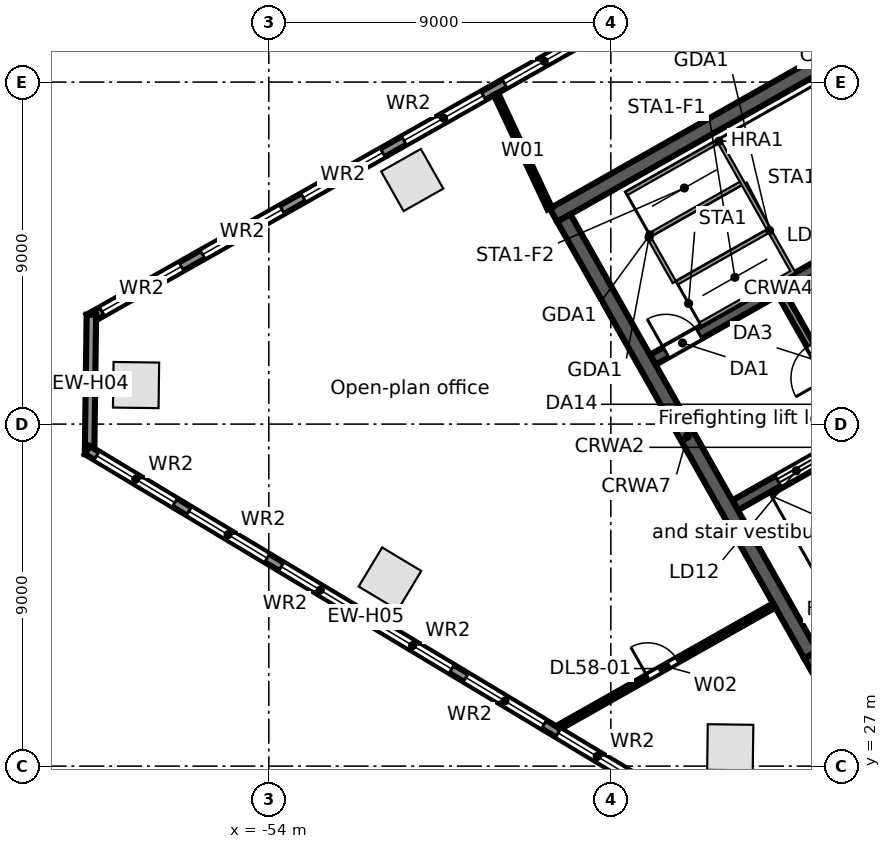
"""IFC4 building model, lengths in metres.
Left out: names, types, materials, properties, quantities, classifications, styles, units other than length and angle.
Written with IfcOpenShell. Run it as: python <this file> out.ifc"""

import sys

from ifc_helpers import new_model, si_unit, direction, frame, frame_2d, origin, origin_2d, place, context, subcontext, project, spatial, rectangle, extrude, element, fill, save


model = new_model("IFC4")
c1 = context("Model", 3, precision=1e-05, world=origin(), true_north=direction((0.0, 1.0)))
c2 = subcontext(c1, "Body", "Model", "MODEL_VIEW")
j1 = project(units=[si_unit("LENGTHUNIT", "METRE"), si_unit("PLANEANGLEUNIT", "RADIAN")], contexts=[c1])
p1 = place(None, origin())
s1 = spatial("IfcSite", under=j1, at=p1, CompositionType="ELEMENT")
p2 = place(p1, origin())
s2 = spatial("IfcBuilding", under=s1, at=p2, CompositionType="ELEMENT")
p3 = place(p2, frame((0.0, 0.0, 266.5)))
s3 = spatial("IfcBuildingStorey", under=s2, at=p3, CompositionType="ELEMENT", Elevation=266.5)
for number, where, z_axis, x_axis in (
    (1, (-50.226, 42.423, 0.0), (0.0, 0.0, 1.0), (-0.87, -0.492, 0.0)),
    (2, (-57.493, 37.027, 0.0), (0.0, 0.0, 1.0), (-0.013, -1.0, 0.0)),
    (3, (-50.812, 31.931, 0.0), (0.0, 0.0, 1.0), (0.857, -0.515, 0.0)),
    (4, (-41.858, 27.495, 0.0), (0.0, 0.0, 1.0), (1.0, -0.013, 0.0)),
):
    element("IfcColumn", number, at=place(p3, frame(where, z_axis=z_axis, x_axis=x_axis)), inside=s3, PredefinedType="COLUMN", context=c2, shape_type="SweptSolid", body=[
        extrude(rectangle(XDim=1.2, YDim=1.2, at=origin_2d()), origin(), (0.0, 0.0, 1.0), 3.8),
    ])
p4 = place(p3, frame((-58.732, 38.771, 0.0), z_axis=(0.0, 0.0, 1.0), x_axis=(0.870355615581, 0.492423702137, 0.0)))
e5 = element("IfcWall", 5, at=p4, inside=s3, PredefinedType="STANDARD", context=c2, shape_type="SweptSolid", body=[
    extrude(rectangle(XDim=64.052, YDim=0.25, at=frame_2d((32.026, 0.0))), origin(), (0.0, 0.0, 1.0), 3.52),
])
p5 = place(p4, frame((61.259, 0.0, 0.8)))
e6 = element("IfcOpeningElement", 6, at=p5, cuts=e5, PredefinedType="OPENING", context=c2, shape_type="SweptSolid", body=[
    extrude(rectangle(XDim=2.4, YDim=2.2, at=frame_2d((1.2, 1.1))), frame((0.0, 0.135, 0.0), z_axis=(0.0, -1.0, 0.0), x_axis=(1.0, 0.0, 0.0)), (0.0, 0.0, 1.0), 0.27),
])
p6 = place(p4, frame((58.216, 0.0, 0.8)))
e7 = element("IfcOpeningElement", 7, at=p6, cuts=e5, PredefinedType="OPENING", context=c2, shape_type="SweptSolid", body=[
    extrude(rectangle(XDim=2.4, YDim=2.2, at=frame_2d((1.2, 1.1))), frame((0.0, 0.135, 0.0), z_axis=(0.0, -1.0, 0.0), x_axis=(1.0, 0.0, 0.0)), (0.0, 0.0, 1.0), 0.27),
])
p7 = place(p4, frame((55.173, 0.0, 0.8)))
e8 = element("IfcOpeningElement", 8, at=p7, cuts=e5, PredefinedType="OPENING", context=c2, shape_type="SweptSolid", body=[
    extrude(rectangle(XDim=2.4, YDim=2.2, at=frame_2d((1.2, 1.1))), frame((0.0, 0.135, 0.0), z_axis=(0.0, -1.0, 0.0), x_axis=(1.0, 0.0, 0.0)), (0.0, 0.0, 1.0), 0.27),
])
p8 = place(p4, frame((52.129, 0.0, 0.8)))
e9 = element("IfcOpeningElement", 9, at=p8, cuts=e5, PredefinedType="OPENING", context=c2, shape_type="SweptSolid", body=[
    extrude(rectangle(XDim=2.4, YDim=2.2, at=frame_2d((1.2, 1.1))), frame((0.0, 0.135, 0.0), z_axis=(0.0, -1.0, 0.0), x_axis=(1.0, 0.0, 0.0)), (0.0, 0.0, 1.0), 0.27),
])
p9 = place(p4, frame((49.086, 0.0, 0.8)))
e10 = element("IfcOpeningElement", 10, at=p9, cuts=e5, PredefinedType="OPENING", context=c2, shape_type="SweptSolid", body=[
    extrude(rectangle(XDim=2.4, YDim=2.2, at=frame_2d((1.2, 1.1))), frame((0.0, 0.135, 0.0), z_axis=(0.0, -1.0, 0.0), x_axis=(1.0, 0.0, 0.0)), (0.0, 0.0, 1.0), 0.27),
])
p10 = place(p4, frame((46.043, 0.0, 0.8)))
e11 = element("IfcOpeningElement", 11, at=p10, cuts=e5, PredefinedType="OPENING", context=c2, shape_type="SweptSolid", body=[
    extrude(rectangle(XDim=2.4, YDim=2.2, at=frame_2d((1.2, 1.1))), frame((0.0, 0.135, 0.0), z_axis=(0.0, -1.0, 0.0), x_axis=(1.0, 0.0, 0.0)), (0.0, 0.0, 1.0), 0.27),
])
p11 = place(p4, frame((43.0, 0.0, 0.8)))
e12 = element("IfcOpeningElement", 12, at=p11, cuts=e5, PredefinedType="OPENING", context=c2, shape_type="SweptSolid", body=[
    extrude(rectangle(XDim=2.4, YDim=2.2, at=frame_2d((1.2, 1.1))), frame((0.0, 0.135, 0.0), z_axis=(0.0, -1.0, 0.0), x_axis=(1.0, 0.0, 0.0)), (0.0, 0.0, 1.0), 0.27),
])
p12 = place(p4, frame((39.956, 0.0, 0.8)))
e13 = element("IfcOpeningElement", 13, at=p12, cuts=e5, PredefinedType="OPENING", context=c2, shape_type="SweptSolid", body=[
    extrude(rectangle(XDim=2.4, YDim=2.2, at=frame_2d((1.2, 1.1))), frame((0.0, 0.135, 0.0), z_axis=(0.0, -1.0, 0.0), x_axis=(1.0, 0.0, 0.0)), (0.0, 0.0, 1.0), 0.27),
])
p13 = place(p4, frame((36.913, 0.0, 0.8)))
e14 = element("IfcOpeningElement", 14, at=p13, cuts=e5, PredefinedType="OPENING", context=c2, shape_type="SweptSolid", body=[
    extrude(rectangle(XDim=2.4, YDim=2.2, at=frame_2d((1.2, 1.1))), frame((0.0, 0.135, 0.0), z_axis=(0.0, -1.0, 0.0), x_axis=(1.0, 0.0, 0.0)), (0.0, 0.0, 1.0), 0.27),
])
p14 = place(p4, frame((33.87, 0.0, 0.8)))
e15 = element("IfcOpeningElement", 15, at=p14, cuts=e5, PredefinedType="OPENING", context=c2, shape_type="SweptSolid", body=[
    extrude(rectangle(XDim=2.4, YDim=2.2, at=frame_2d((1.2, 1.1))), frame((0.0, 0.135, 0.0), z_axis=(0.0, -1.0, 0.0), x_axis=(1.0, 0.0, 0.0)), (0.0, 0.0, 1.0), 0.27),
])
p15 = place(p4, frame((30.826, 0.0, 0.8)))
e16 = element("IfcOpeningElement", 16, at=p15, cuts=e5, PredefinedType="OPENING", context=c2, shape_type="SweptSolid", body=[
    extrude(rectangle(XDim=2.4, YDim=2.2, at=frame_2d((1.2, 1.1))), frame((0.0, 0.135, 0.0), z_axis=(0.0, -1.0, 0.0), x_axis=(1.0, 0.0, 0.0)), (0.0, 0.0, 1.0), 0.27),
])
p16 = place(p4, frame((27.783, 0.0, 0.8)))
e17 = element("IfcOpeningElement", 17, at=p16, cuts=e5, PredefinedType="OPENING", context=c2, shape_type="SweptSolid", body=[
    extrude(rectangle(XDim=2.4, YDim=2.2, at=frame_2d((1.2, 1.1))), frame((0.0, 0.135, 0.0), z_axis=(0.0, -1.0, 0.0), x_axis=(1.0, 0.0, 0.0)), (0.0, 0.0, 1.0), 0.27),
])
p17 = place(p4, frame((24.74, 0.0, 0.8)))
e18 = element("IfcOpeningElement", 18, at=p17, cuts=e5, PredefinedType="OPENING", context=c2, shape_type="SweptSolid", body=[
    extrude(rectangle(XDim=2.4, YDim=2.2, at=frame_2d((1.2, 1.1))), frame((0.0, 0.135, 0.0), z_axis=(0.0, -1.0, 0.0), x_axis=(1.0, 0.0, 0.0)), (0.0, 0.0, 1.0), 0.27),
])
p18 = place(p4, frame((21.696, 0.0, 0.8)))
e19 = element("IfcOpeningElement", 19, at=p18, cuts=e5, PredefinedType="OPENING", context=c2, shape_type="SweptSolid", body=[
    extrude(rectangle(XDim=2.4, YDim=2.2, at=frame_2d((1.2, 1.1))), frame((0.0, 0.135, 0.0), z_axis=(0.0, -1.0, 0.0), x_axis=(1.0, 0.0, 0.0)), (0.0, 0.0, 1.0), 0.27),
])
p19 = place(p4, frame((18.653, 0.0, 0.8)))
e20 = element("IfcOpeningElement", 20, at=p19, cuts=e5, PredefinedType="OPENING", context=c2, shape_type="SweptSolid", body=[
    extrude(rectangle(XDim=2.4, YDim=2.2, at=frame_2d((1.2, 1.1))), frame((0.0, 0.135, 0.0), z_axis=(0.0, -1.0, 0.0), x_axis=(1.0, 0.0, 0.0)), (0.0, 0.0, 1.0), 0.27),
])
p20 = place(p4, frame((15.61, 0.0, 0.8)))
e21 = element("IfcOpeningElement", 21, at=p20, cuts=e5, PredefinedType="OPENING", context=c2, shape_type="SweptSolid", body=[
    extrude(rectangle(XDim=2.4, YDim=2.2, at=frame_2d((1.2, 1.1))), frame((0.0, 0.135, 0.0), z_axis=(0.0, -1.0, 0.0), x_axis=(1.0, 0.0, 0.0)), (0.0, 0.0, 1.0), 0.27),
])
p21 = place(p4, frame((12.567, 0.0, 0.8)))
e22 = element("IfcOpeningElement", 22, at=p21, cuts=e5, PredefinedType="OPENING", context=c2, shape_type="SweptSolid", body=[
    extrude(rectangle(XDim=2.4, YDim=2.2, at=frame_2d((1.2, 1.1))), frame((0.0, 0.135, 0.0), z_axis=(0.0, -1.0, 0.0), x_axis=(1.0, 0.0, 0.0)), (0.0, 0.0, 1.0), 0.27),
])
p22 = place(p4, frame((9.523, 0.0, 0.8)))
e23 = element("IfcOpeningElement", 23, at=p22, cuts=e5, PredefinedType="OPENING", context=c2, shape_type="SweptSolid", body=[
    extrude(rectangle(XDim=2.4, YDim=2.2, at=frame_2d((1.2, 1.1))), frame((0.0, 0.135, 0.0), z_axis=(0.0, -1.0, 0.0), x_axis=(1.0, 0.0, 0.0)), (0.0, 0.0, 1.0), 0.27),
])
p23 = place(p4, frame((6.48, 0.0, 0.8)))
e24 = element("IfcOpeningElement", 24, at=p23, cuts=e5, PredefinedType="OPENING", context=c2, shape_type="SweptSolid", body=[
    extrude(rectangle(XDim=2.4, YDim=2.2, at=frame_2d((1.2, 1.1))), frame((0.0, 0.135, 0.0), z_axis=(0.0, -1.0, 0.0), x_axis=(1.0, 0.0, 0.0)), (0.0, 0.0, 1.0), 0.27),
])
p24 = place(p4, frame((3.437, 0.0, 0.8)))
e25 = element("IfcOpeningElement", 25, at=p24, cuts=e5, PredefinedType="OPENING", context=c2, shape_type="SweptSolid", body=[
    extrude(rectangle(XDim=2.4, YDim=2.2, at=frame_2d((1.2, 1.1))), frame((0.0, 0.135, 0.0), z_axis=(0.0, -1.0, 0.0), x_axis=(1.0, 0.0, 0.0)), (0.0, 0.0, 1.0), 0.27),
])
p25 = place(p4, frame((0.393, 0.0, 0.8)))
e26 = element("IfcOpeningElement", 26, at=p25, cuts=e5, PredefinedType="OPENING", context=c2, shape_type="SweptSolid", body=[
    extrude(rectangle(XDim=2.4, YDim=2.2, at=frame_2d((1.2, 1.1))), frame((0.0, 0.135, 0.0), z_axis=(0.0, -1.0, 0.0), x_axis=(1.0, 0.0, 0.0)), (0.0, 0.0, 1.0), 0.27),
])
p26 = place(p3, frame((-58.717, 35.208, 0.0), z_axis=(0.0, 0.0, 1.0), x_axis=(0.01310512158, 0.999914124207, 0.0)))
e27 = element("IfcWall", 27, at=p26, inside=s3, PredefinedType="STANDARD", context=c2, shape_type="SweptSolid", body=[
    extrude(rectangle(XDim=3.67, YDim=0.25, at=frame_2d((1.835, 0.0))), origin(), (0.0, 0.0, 1.0), 3.52),
])
p27 = place(p3, frame((-44.115, 26.507, 0.0), z_axis=(0.0, 0.0, 1.0), x_axis=(-0.857166583633, 0.515039268311, 0.0)))
e28 = element("IfcWall", 28, at=p27, inside=s3, PredefinedType="STANDARD", context=c2, shape_type="SweptSolid", body=[
    extrude(rectangle(XDim=17.106, YDim=0.25, at=frame_2d((8.553, 0.0))), origin(), (0.0, 0.0, 1.0), 3.52),
])
p28 = place(p27, frame((14.417, 0.0, 0.8)))
e29 = element("IfcOpeningElement", 29, at=p28, cuts=e28, PredefinedType="OPENING", context=c2, shape_type="SweptSolid", body=[
    extrude(rectangle(XDim=2.4, YDim=2.2, at=frame_2d((1.2, 1.1))), frame((0.0, 0.135, 0.0), z_axis=(0.0, -1.0, 0.0), x_axis=(1.0, 0.0, 0.0)), (0.0, 0.0, 1.0), 0.27),
])
p29 = place(p27, frame((11.584, 0.0, 0.8)))
e30 = element("IfcOpeningElement", 30, at=p29, cuts=e28, PredefinedType="OPENING", context=c2, shape_type="SweptSolid", body=[
    extrude(rectangle(XDim=2.4, YDim=2.2, at=frame_2d((1.2, 1.1))), frame((0.0, 0.135, 0.0), z_axis=(0.0, -1.0, 0.0), x_axis=(1.0, 0.0, 0.0)), (0.0, 0.0, 1.0), 0.27),
])
p30 = place(p27, frame((8.75, 0.0, 0.8)))
e31 = element("IfcOpeningElement", 31, at=p30, cuts=e28, PredefinedType="OPENING", context=c2, shape_type="SweptSolid", body=[
    extrude(rectangle(XDim=2.4, YDim=2.2, at=frame_2d((1.2, 1.1))), frame((0.0, 0.135, 0.0), z_axis=(0.0, -1.0, 0.0), x_axis=(1.0, 0.0, 0.0)), (0.0, 0.0, 1.0), 0.27),
])
p31 = place(p27, frame((5.917, 0.0, 0.8)))
e32 = element("IfcOpeningElement", 32, at=p31, cuts=e28, PredefinedType="OPENING", context=c2, shape_type="SweptSolid", body=[
    extrude(rectangle(XDim=2.4, YDim=2.2, at=frame_2d((1.2, 1.1))), frame((0.0, 0.135, 0.0), z_axis=(0.0, -1.0, 0.0), x_axis=(1.0, 0.0, 0.0)), (0.0, 0.0, 1.0), 0.27),
])
p32 = place(p27, frame((3.084, 0.0, 0.8)))
e33 = element("IfcOpeningElement", 33, at=p32, cuts=e28, PredefinedType="OPENING", context=c2, shape_type="SweptSolid", body=[
    extrude(rectangle(XDim=2.4, YDim=2.2, at=frame_2d((1.2, 1.1))), frame((0.0, 0.135, 0.0), z_axis=(0.0, -1.0, 0.0), x_axis=(1.0, 0.0, 0.0)), (0.0, 0.0, 1.0), 0.27),
])
p33 = place(p27, frame((0.25, 0.0, 0.8)))
e34 = element("IfcOpeningElement", 34, at=p33, cuts=e28, PredefinedType="OPENING", context=c2, shape_type="SweptSolid", body=[
    extrude(rectangle(XDim=2.4, YDim=2.2, at=frame_2d((1.2, 1.1))), frame((0.0, 0.135, 0.0), z_axis=(0.0, -1.0, 0.0), x_axis=(1.0, 0.0, 0.0)), (0.0, 0.0, 1.0), 0.27),
])
p34 = place(p3, frame((-39.813, 29.662, 0.0), z_axis=(0.0, 0.0, 1.0), x_axis=(0.870350116061, 0.492433422375, 0.0)))
e35 = element("IfcWall", 35, at=p34, inside=s3, PredefinedType="SOLIDWALL", context=c2, shape_type="SweptSolid", body=[
    extrude(rectangle(XDim=17.0, YDim=0.4, at=frame_2d((8.5, 0.0))), origin(), (0.0, 0.0, 1.0), 3.52),
])
p35 = place(p34, frame((7.2, 0.0, 0.0)))
e36 = element("IfcOpeningElement", 36, at=p35, cuts=e35, PredefinedType="OPENING", context=c2, shape_type="SweptSolid", body=[
    extrude(rectangle(XDim=1.2, YDim=2.1, at=frame_2d((0.6, 1.05))), frame((0.0, 0.21, 0.0), z_axis=(0.0, -1.0, 0.0), x_axis=(1.0, 0.0, 0.0)), (0.0, 0.0, 1.0), 0.42),
])
p36 = place(p3, frame((-41.73, 33.863, 0.0), z_axis=(0.0, 0.0, 1.0), x_axis=(0.870350800578, 0.492432212525, 0.0)))
e37 = element("IfcWall", 37, at=p36, inside=s3, PredefinedType="SOLIDWALL", context=c2, shape_type="SweptSolid", body=[
    extrude(rectangle(XDim=6.2, YDim=0.3, at=frame_2d((3.1, 0.0))), origin(), (0.0, 0.0, 1.0), 3.52),
])
p37 = place(p36, frame((1.3, 0.0, 0.0)))
e38 = element("IfcOpeningElement", 38, at=p37, cuts=e37, PredefinedType="OPENING", context=c2, shape_type="SweptSolid", body=[
    extrude(rectangle(XDim=1.1, YDim=2.1, at=frame_2d((0.55, 1.05))), frame((0.0, 0.16, 0.0), z_axis=(0.0, -1.0, 0.0), x_axis=(1.0, 0.0, 0.0)), (0.0, 0.0, 1.0), 0.32),
])
p38 = place(p36, frame((4.95, 0.0, 0.0)))
e39 = element("IfcOpeningElement", 39, at=p38, cuts=e37, PredefinedType="OPENING", context=c2, shape_type="SweptSolid", body=[
    extrude(rectangle(XDim=0.9, YDim=2.1, at=frame_2d((0.45, 1.05))), frame((0.0, 0.16, 0.0), z_axis=(0.0, -1.0, 0.0), x_axis=(1.0, 0.0, 0.0)), (0.0, 0.0, 1.0), 0.32),
])
p39 = place(p3, frame((-43.897, 37.692, 0.0), z_axis=(0.0, 0.0, 1.0), x_axis=(0.870356351998, 0.492422400523, 0.0)))
e40 = element("IfcWall", 40, at=p39, inside=s3, PredefinedType="SOLIDWALL", context=c2, shape_type="SweptSolid", body=[
    extrude(rectangle(XDim=7.6, YDim=0.3, at=frame_2d((3.8, 0.0))), origin(), (0.0, 0.0, 1.0), 3.52),
])
p40 = place(p39, frame((0.4, 0.0, 0.0)))
e41 = element("IfcOpeningElement", 41, at=p40, cuts=e40, PredefinedType="OPENING", context=c2, shape_type="SweptSolid", body=[
    extrude(rectangle(XDim=1.0, YDim=2.1, at=frame_2d((0.5, 1.05))), frame((0.0, 0.16, 0.0), z_axis=(0.0, -1.0, 0.0), x_axis=(1.0, 0.0, 0.0)), (0.0, 0.0, 1.0), 0.32),
])
p41 = place(p3, frame((-46.51, 41.499, 0.0), z_axis=(0.0, 0.0, 1.0), x_axis=(0.870356271124, 0.492422543467, 0.0)))
e42 = element("IfcWall", 42, at=p41, inside=s3, PredefinedType="SOLIDWALL", context=c2, shape_type="SweptSolid", body=[
    extrude(rectangle(XDim=17.0, YDim=0.4, at=frame_2d((8.5, 0.0))), origin(), (0.0, 0.0, 1.0), 3.52),
])
p42 = place(p3, frame((-46.238, 41.423, 0.0), z_axis=(0.0, 0.0, 1.0), x_axis=(0.492421663121, -0.870356769198, 0.0)))
e43 = element("IfcWall", 43, at=p42, inside=s3, PredefinedType="SOLIDWALL", context=c2, shape_type="SweptSolid", body=[
    extrude(rectangle(XDim=13.2, YDim=0.4, at=frame_2d((6.6, 0.0))), origin(), (0.0, 0.0, 1.0), 3.52),
])
p43 = place(p3, frame((-40.516, 39.433, 0.0), z_axis=(0.0, 0.0, 1.0), x_axis=(0.492453559952, -0.87033872216, 0.0)))
e44 = element("IfcWall", 44, at=p43, inside=s3, PredefinedType="PARTITIONING", context=c2, shape_type="SweptSolid", body=[
    extrude(rectangle(XDim=4.1, YDim=0.2, at=frame_2d((2.05, 0.0))), origin(), (0.0, 0.0, 1.0), 3.52),
])
p44 = place(p43, frame((1.55, 0.0, 0.0)))
e45 = element("IfcOpeningElement", 45, at=p44, cuts=e44, PredefinedType="OPENING", context=c2, shape_type="SweptSolid", body=[
    extrude(rectangle(XDim=1.0, YDim=2.1, at=frame_2d((0.5, 1.05))), frame((0.0, 0.11, 0.0), z_axis=(0.0, -1.0, 0.0), x_axis=(1.0, 0.0, 0.0)), (0.0, 0.0, 1.0), 0.22),
])
p45 = place(p3, frame((-48.022, 44.687, 0.0), z_axis=(0.0, 0.0, 1.0), x_axis=(0.424510917438, -0.905422818895, 0.0)))
e46 = element("IfcWall", 46, at=p45, inside=s3, PredefinedType="PARTITIONING", context=c2, shape_type="SweptSolid", body=[
    extrude(rectangle(XDim=3.329, YDim=0.125, at=frame_2d((1.665, 0.0))), origin(), (0.0, 0.0, 1.0), 2.888),
])
p46 = place(p3, frame((-46.381, 28.015, 0.0), z_axis=(0.0, 0.0, 1.0), x_axis=(0.870364232693, 0.492408471139, 0.0)))
e47 = element("IfcWall", 47, at=p46, inside=s3, PredefinedType="PARTITIONING", context=c2, shape_type="SweptSolid", body=[
    extrude(rectangle(XDim=6.527, YDim=0.125, at=frame_2d((3.264, 0.0))), origin(), (0.0, 0.0, 1.0), 2.8),
])
p47 = place(p46, frame((2.7, 0.0, 0.0)))
e48 = element("IfcOpeningElement", 48, at=p47, cuts=e47, PredefinedType="OPENING", context=c2, shape_type="SweptSolid", body=[
    extrude(rectangle(XDim=0.9, YDim=2.1, at=frame_2d((0.45, 1.05))), frame((0.0, 0.073, 0.0), z_axis=(0.0, -1.0, 0.0), x_axis=(1.0, 0.0, 0.0)), (0.0, 0.0, 1.0), 0.145),
])
p48 = place(p21, origin())
e49 = element("IfcWindow", 49, at=p48, inside=s3, PartitioningType="SINGLE_PANEL", PredefinedType="WINDOW", context=c2, shape_type="SweptSolid", body=[
    extrude(rectangle(XDim=2.4, YDim=2.2, at=frame_2d((1.2, 1.1))), frame((0.0, 0.03, 0.0), z_axis=(0.0, -1.0, 0.0), x_axis=(1.0, 0.0, 0.0)), (0.0, 0.0, 1.0), 0.06),
])
fill(e22, e49)
p49 = place(p22, origin())
e50 = element("IfcWindow", 50, at=p49, inside=s3, PartitioningType="SINGLE_PANEL", PredefinedType="WINDOW", context=c2, shape_type="SweptSolid", body=[
    extrude(rectangle(XDim=2.4, YDim=2.2, at=frame_2d((1.2, 1.1))), frame((0.0, 0.03, 0.0), z_axis=(0.0, -1.0, 0.0), x_axis=(1.0, 0.0, 0.0)), (0.0, 0.0, 1.0), 0.06),
])
fill(e23, e50)
p50 = place(p23, origin())
e51 = element("IfcWindow", 51, at=p50, inside=s3, PartitioningType="SINGLE_PANEL", PredefinedType="WINDOW", context=c2, shape_type="SweptSolid", body=[
    extrude(rectangle(XDim=2.4, YDim=2.2, at=frame_2d((1.2, 1.1))), frame((0.0, 0.03, 0.0), z_axis=(0.0, -1.0, 0.0), x_axis=(1.0, 0.0, 0.0)), (0.0, 0.0, 1.0), 0.06),
])
fill(e24, e51)
p51 = place(p24, origin())
e52 = element("IfcWindow", 52, at=p51, inside=s3, PartitioningType="SINGLE_PANEL", PredefinedType="WINDOW", context=c2, shape_type="SweptSolid", body=[
    extrude(rectangle(XDim=2.4, YDim=2.2, at=frame_2d((1.2, 1.1))), frame((0.0, 0.03, 0.0), z_axis=(0.0, -1.0, 0.0), x_axis=(1.0, 0.0, 0.0)), (0.0, 0.0, 1.0), 0.06),
])
fill(e25, e52)
p52 = place(p25, origin())
e53 = element("IfcWindow", 53, at=p52, inside=s3, PartitioningType="SINGLE_PANEL", PredefinedType="WINDOW", context=c2, shape_type="SweptSolid", body=[
    extrude(rectangle(XDim=2.4, YDim=2.2, at=frame_2d((1.2, 1.1))), frame((0.0, 0.03, 0.0), z_axis=(0.0, -1.0, 0.0), x_axis=(1.0, 0.0, 0.0)), (0.0, 0.0, 1.0), 0.06),
])
fill(e26, e53)
p53 = place(p28, origin())
e54 = element("IfcWindow", 54, at=p53, inside=s3, PartitioningType="SINGLE_PANEL", PredefinedType="WINDOW", context=c2, shape_type="SweptSolid", body=[
    extrude(rectangle(XDim=2.4, YDim=2.2, at=frame_2d((1.2, 1.1))), frame((0.0, 0.03, 0.0), z_axis=(0.0, -1.0, 0.0), x_axis=(1.0, 0.0, 0.0)), (0.0, 0.0, 1.0), 0.06),
])
fill(e29, e54)
p54 = place(p29, origin())
e55 = element("IfcWindow", 55, at=p54, inside=s3, PartitioningType="SINGLE_PANEL", PredefinedType="WINDOW", context=c2, shape_type="SweptSolid", body=[
    extrude(rectangle(XDim=2.4, YDim=2.2, at=frame_2d((1.2, 1.1))), frame((0.0, 0.03, 0.0), z_axis=(0.0, -1.0, 0.0), x_axis=(1.0, 0.0, 0.0)), (0.0, 0.0, 1.0), 0.06),
])
fill(e30, e55)
p55 = place(p30, origin())
e56 = element("IfcWindow", 56, at=p55, inside=s3, PartitioningType="SINGLE_PANEL", PredefinedType="WINDOW", context=c2, shape_type="SweptSolid", body=[
    extrude(rectangle(XDim=2.4, YDim=2.2, at=frame_2d((1.2, 1.1))), frame((0.0, 0.03, 0.0), z_axis=(0.0, -1.0, 0.0), x_axis=(1.0, 0.0, 0.0)), (0.0, 0.0, 1.0), 0.06),
])
fill(e31, e56)
p56 = place(p31, origin())
e57 = element("IfcWindow", 57, at=p56, inside=s3, PartitioningType="SINGLE_PANEL", PredefinedType="WINDOW", context=c2, shape_type="SweptSolid", body=[
    extrude(rectangle(XDim=2.4, YDim=2.2, at=frame_2d((1.2, 1.1))), frame((0.0, 0.03, 0.0), z_axis=(0.0, -1.0, 0.0), x_axis=(1.0, 0.0, 0.0)), (0.0, 0.0, 1.0), 0.06),
])
fill(e32, e57)
p57 = place(p32, origin())
e58 = element("IfcWindow", 58, at=p57, inside=s3, PartitioningType="SINGLE_PANEL", PredefinedType="WINDOW", context=c2, shape_type="SweptSolid", body=[
    extrude(rectangle(XDim=2.4, YDim=2.2, at=frame_2d((1.2, 1.1))), frame((0.0, 0.03, 0.0), z_axis=(0.0, -1.0, 0.0), x_axis=(1.0, 0.0, 0.0)), (0.0, 0.0, 1.0), 0.06),
])
fill(e33, e58)
p58 = place(p33, origin())
e59 = element("IfcWindow", 59, at=p58, inside=s3, PartitioningType="SINGLE_PANEL", PredefinedType="WINDOW", context=c2, shape_type="SweptSolid", body=[
    extrude(rectangle(XDim=2.4, YDim=2.2, at=frame_2d((1.2, 1.1))), frame((0.0, 0.03, 0.0), z_axis=(0.0, -1.0, 0.0), x_axis=(1.0, 0.0, 0.0)), (0.0, 0.0, 1.0), 0.06),
])
fill(e34, e59)
p59 = place(p37, origin())
e60 = element("IfcDoor", 60, at=p59, inside=s3, OperationType="DOUBLE_DOOR_SLIDING", PredefinedType="DOOR", context=c2, shape_type="SweptSolid", body=[
    extrude(rectangle(XDim=1.1, YDim=2.1, at=frame_2d((0.55, 1.05))), frame((0.0, 0.025, 0.0), z_axis=(0.0, -1.0, 0.0), x_axis=(1.0, 0.0, 0.0)), (0.0, 0.0, 1.0), 0.05),
])
fill(e38, e60)
p60 = place(p40, origin())
e61 = element("IfcDoor", 61, at=p60, inside=s3, OperationType="SINGLE_SWING_LEFT", PredefinedType="DOOR", context=c2, shape_type="SweptSolid", body=[
    extrude(rectangle(XDim=1.0, YDim=2.1, at=frame_2d((0.5, 1.05))), frame((0.0, 0.025, 0.0), z_axis=(0.0, -1.0, 0.0), x_axis=(1.0, 0.0, 0.0)), (0.0, 0.0, 1.0), 0.05),
])
fill(e41, e61)
p61 = place(p44, frame((1.0, 0.0, 0.0), z_axis=(0.0, 0.0, 1.0), x_axis=(-1.0, 0.0, 0.0)))
e62 = element("IfcDoor", 62, at=p61, inside=s3, OperationType="SINGLE_SWING_LEFT", PredefinedType="DOOR", context=c2, shape_type="SweptSolid", body=[
    extrude(rectangle(XDim=1.0, YDim=2.1, at=frame_2d((0.5, 1.05))), frame((0.0, 0.025, 0.0), z_axis=(0.0, -1.0, 0.0), x_axis=(1.0, 0.0, 0.0)), (0.0, 0.0, 1.0), 0.05),
])
fill(e45, e62)
p62 = place(p47, origin())
e63 = element("IfcDoor", 63, at=p62, inside=s3, OperationType="SINGLE_SWING_LEFT", PredefinedType="DOOR", context=c2, shape_type="SweptSolid", body=[
    extrude(rectangle(XDim=0.9, YDim=2.1, at=frame_2d((0.45, 1.05))), frame((0.0, 0.025, 0.0), z_axis=(0.0, -1.0, 0.0), x_axis=(1.0, 0.0, 0.0)), (0.0, 0.0, 1.0), 0.05),
])
fill(e48, e63)
save(model, sys.argv[1])
